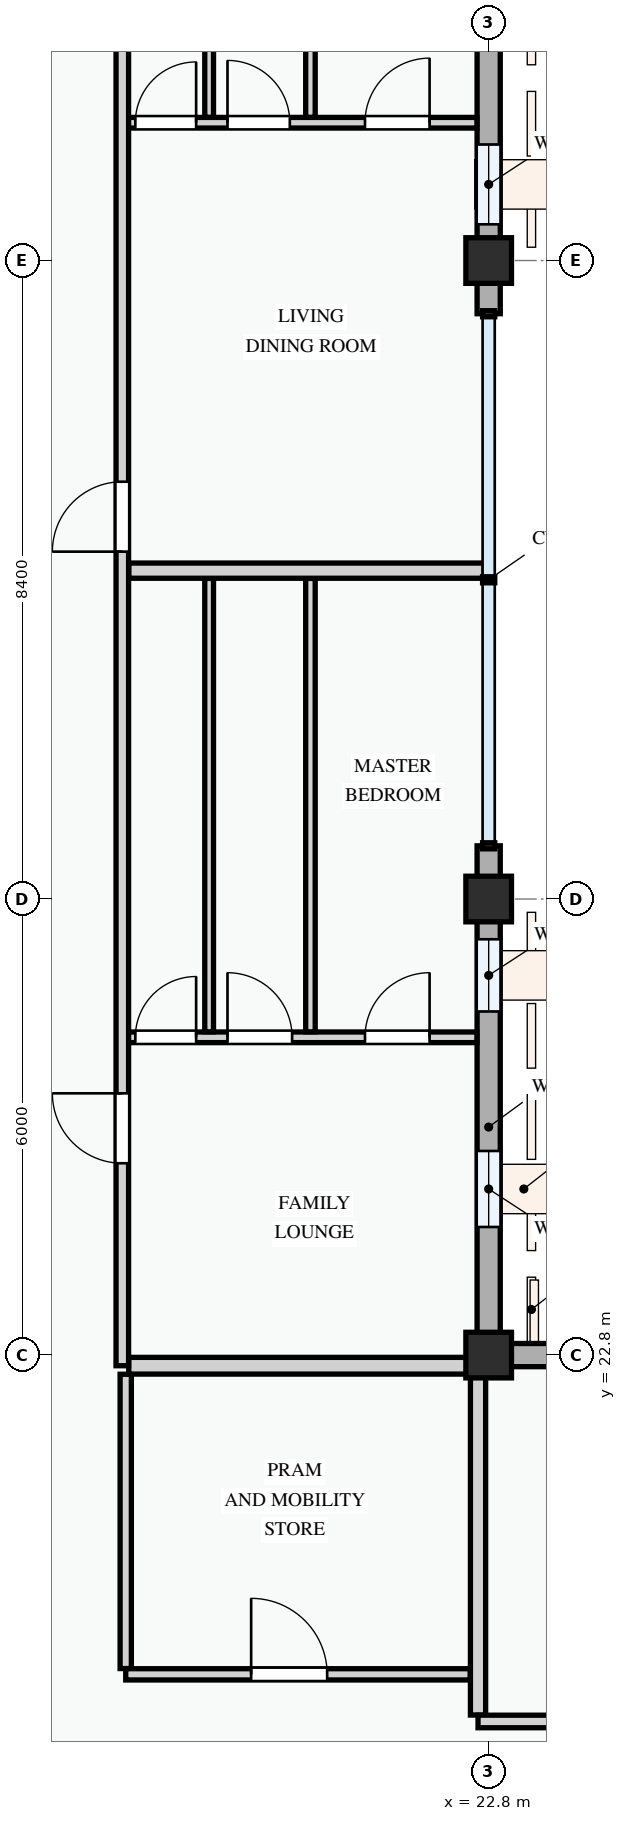
"""IFC4 building model, lengths in metres.
Left out: names, types, materials, properties, quantities, classifications, styles, units other than length and angle.
Written with IfcOpenShell. Run it as: python <this file> out.ifc"""

import sys

from ifc_helpers import new_model, si_unit, direction, frame, frame_2d, origin, origin_2d, place, context, subcontext, project, spatial, rectangle, extrude, element, fill, save


model = new_model("IFC4")
c1 = context("Model", 3, precision=1e-05, world=origin(), true_north=direction((0.0, 1.0)))
c2 = subcontext(c1, "Body", "Model", "MODEL_VIEW")
j1 = project(units=[si_unit("LENGTHUNIT", "METRE"), si_unit("PLANEANGLEUNIT", "RADIAN")], contexts=[c1])
p1 = place(None, origin())
s1 = spatial("IfcSite", under=j1, at=p1, CompositionType="ELEMENT")
p2 = place(p1, origin())
s2 = spatial("IfcBuilding", under=s1, at=p2, CompositionType="ELEMENT")
p3 = place(p2, frame((0.0, 0.0, 18.0)))
s3 = spatial("IfcBuildingStorey", under=s2, at=p3, CompositionType="ELEMENT", Elevation=18.0)
for number, where, z_axis, x_axis in (
    (1, (22.8, 22.8, 0.0), (0.0, 0.0, 1.0), (1.0, 0.0, 0.0)),
    (2, (22.8, 28.8, 0.0), (0.0, 0.0, 1.0), (1.0, 0.0, 0.0)),
    (3, (22.8, 37.2, 0.0), (0.0, 0.0, 1.0), (1.0, 0.0, 0.0)),
):
    element("IfcColumn", number, at=place(p3, frame(where, z_axis=z_axis, x_axis=x_axis)), inside=s3, PredefinedType="COLUMN", context=c2, shape_type="SweptSolid", body=[
        extrude(rectangle(XDim=0.6, YDim=0.6, at=origin_2d()), origin(), (0.0, 0.0, 1.0), 3.3),
    ])
p4 = place(p3, frame((22.8, 22.8, 0.0), z_axis=(0.0, 0.0, 1.0), x_axis=(0.0, 1.0, 0.0)))
e4 = element("IfcWall", 4, at=p4, inside=s3, PredefinedType="STANDARD", context=c2, shape_type="SweptSolid", body=[
    extrude(rectangle(XDim=6.0, YDim=0.305, at=frame_2d((3.0, 0.0))), origin(), (0.0, 0.0, 1.0), 2.575),
])
p5 = place(p4, frame((1.685, 0.0, 0.78)))
e5 = element("IfcOpeningElement", 5, at=p5, cuts=e4, PredefinedType="OPENING", context=c2, shape_type="SweptSolid", body=[
    extrude(rectangle(XDim=1.0, YDim=1.25, at=frame_2d((0.5, 0.625))), frame((0.0, 0.163, 0.0), z_axis=(0.0, -1.0, 0.0), x_axis=(1.0, 0.0, 0.0)), (0.0, 0.0, 1.0), 0.325),
])
p6 = place(p4, frame((4.521, 0.0, 0.78)))
e6 = element("IfcOpeningElement", 6, at=p6, cuts=e4, PredefinedType="OPENING", context=c2, shape_type="SweptSolid", body=[
    extrude(rectangle(XDim=0.95, YDim=1.15, at=frame_2d((0.475, 0.575))), frame((0.0, 0.163, 0.0), z_axis=(0.0, -1.0, 0.0), x_axis=(1.0, 0.0, 0.0)), (0.0, 0.0, 1.0), 0.325),
])
for number, where, z_axis, x_axis in (
    (7, (22.8, 28.8, 0.0), (0.0, 0.0, 1.0), (0.0, 1.0, 0.0)),
    (8, (22.8, 36.5, 0.0), (0.0, 0.0, 1.0), (0.0, 1.0, 0.0)),
):
    element("IfcWall", number, at=place(p3, frame(where, z_axis=z_axis, x_axis=x_axis)), inside=s3, PredefinedType="STANDARD", context=c2, shape_type="SweptSolid", body=[
        extrude(rectangle(XDim=0.7, YDim=0.305, at=frame_2d((0.35, 0.0))), origin(), (0.0, 0.0, 1.0), 2.425),
    ])
p7 = place(p3, frame((22.8, 37.2, 0.0), z_axis=(0.0, 0.0, 1.0), x_axis=(0.0, 1.0, 0.0)))
e9 = element("IfcWall", 9, at=p7, inside=s3, PredefinedType="STANDARD", context=c2, shape_type="SweptSolid", body=[
    extrude(rectangle(XDim=6.0, YDim=0.305, at=frame_2d((3.0, 0.0))), origin(), (0.0, 0.0, 1.0), 2.575),
])
p8 = place(p7, frame((0.476, 0.0, 0.78)))
e10 = element("IfcOpeningElement", 10, at=p8, cuts=e9, PredefinedType="OPENING", context=c2, shape_type="SweptSolid", body=[
    extrude(rectangle(XDim=1.05, YDim=1.2, at=frame_2d((0.525, 0.6))), frame((0.0, 0.163, 0.0), z_axis=(0.0, -1.0, 0.0), x_axis=(1.0, 0.0, 0.0)), (0.0, 0.0, 1.0), 0.325),
])
p9 = place(p7, frame((3.086, 0.0, 0.78)))
e11 = element("IfcOpeningElement", 11, at=p9, cuts=e9, PredefinedType="OPENING", context=c2, shape_type="SweptSolid", body=[
    extrude(rectangle(XDim=1.45, YDim=1.6, at=frame_2d((0.725, 0.8))), frame((0.0, 0.163, 0.0), z_axis=(0.0, -1.0, 0.0), x_axis=(1.0, 0.0, 0.0)), (0.0, 0.0, 1.0), 0.325),
])
p10 = place(p3, frame((28.8, 22.8, 0.0), z_axis=(0.0, 0.0, 1.0), x_axis=(-1.0, 0.0, 0.0)))
e12 = element("IfcWall", 12, at=p10, inside=s3, PredefinedType="STANDARD", context=c2, shape_type="SweptSolid", body=[
    extrude(rectangle(XDim=6.0, YDim=0.305, at=frame_2d((3.0, 0.0))), origin(), (0.0, 0.0, 1.0), 2.475),
])
p11 = place(p10, frame((0.555, 0.0, 0.78)))
e13 = element("IfcOpeningElement", 13, at=p11, cuts=e12, PredefinedType="OPENING", context=c2, shape_type="SweptSolid", body=[
    extrude(rectangle(XDim=0.9, YDim=1.2, at=frame_2d((0.45, 0.6))), frame((0.0, 0.163, 0.0), z_axis=(0.0, -1.0, 0.0), x_axis=(1.0, 0.0, 0.0)), (0.0, 0.0, 1.0), 0.325),
])
p12 = place(p10, frame((2.675, 0.0, 0.78)))
e14 = element("IfcOpeningElement", 14, at=p12, cuts=e12, PredefinedType="OPENING", context=c2, shape_type="SweptSolid", body=[
    extrude(rectangle(XDim=2.28, YDim=1.46, at=frame_2d((1.14, 0.73))), frame((0.0, 0.163, 0.0), z_axis=(0.0, -1.0, 0.0), x_axis=(1.0, 0.0, 0.0)), (0.0, 0.0, 1.0), 0.325),
])
p13 = place(p3, frame((18.025, 18.676, 0.0), z_axis=(0.0, 0.0, 1.0), x_axis=(0.0, 1.0, 0.0)))
e15 = element("IfcWall", 15, at=p13, inside=s3, PredefinedType="PARTITIONING", context=c2, shape_type="SweptSolid", body=[
    extrude(rectangle(XDim=3.872, YDim=0.148, at=frame_2d((1.936, 0.0))), origin(), (0.0, 0.0, 1.0), 3.0),
])
p14 = place(p3, frame((18.025, 18.6, 0.0), z_axis=(0.0, 0.0, 1.0), x_axis=(1.0, 0.0, 0.0)))
e16 = element("IfcWall", 16, at=p14, inside=s3, PredefinedType="PARTITIONING", context=c2, shape_type="SweptSolid", body=[
    extrude(rectangle(XDim=4.533, YDim=0.148, at=frame_2d((2.267, 0.0))), origin(), (0.0, 0.0, 1.0), 3.0),
])
p15 = place(p14, frame((1.65, 0.0, 0.0)))
e17 = element("IfcOpeningElement", 17, at=p15, cuts=e16, PredefinedType="OPENING", context=c2, shape_type="SweptSolid", body=[
    extrude(rectangle(XDim=1.0, YDim=2.15, at=frame_2d((0.5, 1.075))), frame((0.0, 0.084, 0.0), z_axis=(0.0, -1.0, 0.0), x_axis=(1.0, 0.0, 0.0)), (0.0, 0.0, 1.0), 0.168),
])
p16 = place(p3, frame((17.98, 26.981, 0.0), z_axis=(0.0, 0.0, 1.0), x_axis=(1.0, 0.0, 0.0)))
e18 = element("IfcWall", 18, at=p16, inside=s3, PredefinedType="PARTITIONING", context=c2, shape_type="SweptSolid", body=[
    extrude(rectangle(XDim=4.666, YDim=0.14, at=frame_2d((2.333, 0.0))), origin(), (0.0, 0.0, 1.0), 3.0),
])
p17 = place(p16, frame((0.171, 0.0, 0.0)))
e19 = element("IfcOpeningElement", 19, at=p17, cuts=e18, PredefinedType="OPENING", context=c2, shape_type="SweptSolid", body=[
    extrude(rectangle(XDim=0.8, YDim=2.1, at=frame_2d((0.4, 1.05))), frame((0.0, 0.08, 0.0), z_axis=(0.0, -1.0, 0.0), x_axis=(1.0, 0.0, 0.0)), (0.0, 0.0, 1.0), 0.16),
])
p18 = place(p16, frame((1.384, 0.0, 0.0)))
e20 = element("IfcOpeningElement", 20, at=p18, cuts=e18, PredefinedType="OPENING", context=c2, shape_type="SweptSolid", body=[
    extrude(rectangle(XDim=0.85, YDim=2.1, at=frame_2d((0.425, 1.05))), frame((0.0, 0.08, 0.0), z_axis=(0.0, -1.0, 0.0), x_axis=(1.0, 0.0, 0.0)), (0.0, 0.0, 1.0), 0.16),
])
p19 = place(p16, frame((3.193, 0.0, 0.0)))
e21 = element("IfcOpeningElement", 21, at=p19, cuts=e18, PredefinedType="OPENING", context=c2, shape_type="SweptSolid", body=[
    extrude(rectangle(XDim=0.85, YDim=2.1, at=frame_2d((0.425, 1.05))), frame((0.0, 0.08, 0.0), z_axis=(0.0, -1.0, 0.0), x_axis=(1.0, 0.0, 0.0)), (0.0, 0.0, 1.0), 0.16),
])
p20 = place(p3, frame((20.455, 27.053, 0.0), z_axis=(0.0, 0.0, 1.0), x_axis=(0.0, 1.0, 0.0)))
e22 = element("IfcWall", 22, at=p20, inside=s3, PredefinedType="PARTITIONING", context=c2, shape_type="SweptSolid", body=[
    extrude(rectangle(XDim=5.965, YDim=0.125, at=frame_2d((2.983, 0.0))), origin(), (0.0, 0.0, 1.0), 3.0),
])
p21 = place(p3, frame((19.122, 27.053, 0.0), z_axis=(0.0, 0.0, 1.0), x_axis=(0.0, 1.0, 0.0)))
e23 = element("IfcWall", 23, at=p21, inside=s3, PredefinedType="PARTITIONING", context=c2, shape_type="SweptSolid", body=[
    extrude(rectangle(XDim=5.965, YDim=0.115, at=frame_2d((2.983, 0.0))), origin(), (0.0, 0.0, 1.0), 3.0),
])
p22 = place(p3, frame((18.064, 22.66, 0.0), z_axis=(0.0, 0.0, 1.0), x_axis=(1.0, 0.0, 0.0)))
e24 = element("IfcWall", 24, at=p22, inside=s3, PredefinedType="PARTITIONING", context=c2, shape_type="SweptSolid", body=[
    extrude(rectangle(XDim=4.494, YDim=0.22, at=frame_2d((2.247, 0.0))), origin(), (0.0, 0.0, 1.0), 2.375),
])
p23 = place(p3, frame((17.98, 39.013, 0.0), z_axis=(0.0, 0.0, 1.0), x_axis=(1.0, 0.0, 0.0)))
e25 = element("IfcWall", 25, at=p23, inside=s3, PredefinedType="PARTITIONING", context=c2, shape_type="SweptSolid", body=[
    extrude(rectangle(XDim=4.666, YDim=0.14, at=frame_2d((2.333, 0.0))), origin(), (0.0, 0.0, 1.0), 3.0),
])
p24 = place(p23, frame((0.171, 0.0, 0.0)))
e26 = element("IfcOpeningElement", 26, at=p24, cuts=e25, PredefinedType="OPENING", context=c2, shape_type="SweptSolid", body=[
    extrude(rectangle(XDim=0.8, YDim=2.1, at=frame_2d((0.4, 1.05))), frame((0.0, 0.08, 0.0), z_axis=(0.0, -1.0, 0.0), x_axis=(1.0, 0.0, 0.0)), (0.0, 0.0, 1.0), 0.16),
])
p25 = place(p23, frame((1.384, 0.0, 0.0)))
e27 = element("IfcOpeningElement", 27, at=p25, cuts=e25, PredefinedType="OPENING", context=c2, shape_type="SweptSolid", body=[
    extrude(rectangle(XDim=0.82, YDim=2.08, at=frame_2d((0.41, 1.04))), frame((0.0, 0.08, 0.0), z_axis=(0.0, -1.0, 0.0), x_axis=(1.0, 0.0, 0.0)), (0.0, 0.0, 1.0), 0.16),
])
p26 = place(p23, frame((3.193, 0.0, 0.0)))
e28 = element("IfcOpeningElement", 28, at=p26, cuts=e25, PredefinedType="OPENING", context=c2, shape_type="SweptSolid", body=[
    extrude(rectangle(XDim=0.85, YDim=2.1, at=frame_2d((0.425, 1.05))), frame((0.0, 0.08, 0.0), z_axis=(0.0, -1.0, 0.0), x_axis=(1.0, 0.0, 0.0)), (0.0, 0.0, 1.0), 0.16),
])
p27 = place(p3, frame((20.455, 39.085, 0.0), z_axis=(0.0, 0.0, 1.0), x_axis=(0.0, 1.0, 0.0)))
e29 = element("IfcWall", 29, at=p27, inside=s3, PredefinedType="PARTITIONING", context=c2, shape_type="SweptSolid", body=[
    extrude(rectangle(XDim=5.801, YDim=0.125, at=frame_2d((2.9, 0.0))), origin(), (0.0, 0.0, 1.0), 3.0),
])
p28 = place(p3, frame((19.122, 39.085, 0.0), z_axis=(0.0, 0.0, 1.0), x_axis=(0.0, 1.0, 0.0)))
e30 = element("IfcWall", 30, at=p28, inside=s3, PredefinedType="PARTITIONING", context=c2, shape_type="SweptSolid", body=[
    extrude(rectangle(XDim=5.801, YDim=0.115, at=frame_2d((2.9, 0.0))), origin(), (0.0, 0.0, 1.0), 3.0),
])
p29 = place(p3, frame((18.064, 33.12, 0.0), z_axis=(0.0, 0.0, 1.0), x_axis=(1.0, 0.0, 0.0)))
e31 = element("IfcWall", 31, at=p29, inside=s3, PredefinedType="PARTITIONING", context=c2, shape_type="SweptSolid", body=[
    extrude(rectangle(XDim=4.676, YDim=0.2, at=frame_2d((2.338, 0.0))), origin(), (0.0, 0.0, 1.0), 3.0),
])
p30 = place(p3, frame((17.98, 22.66, 0.0), z_axis=(0.0, 0.0, 1.0), x_axis=(0.0, 1.0, 0.0)))
e32 = element("IfcWall", 32, at=p30, inside=s3, PredefinedType="PARTITIONING", context=c2, shape_type="SweptSolid", body=[
    extrude(rectangle(XDim=34.786, YDim=0.165, at=frame_2d((17.393, 0.0))), origin(), (0.0, 0.0, 1.0), 3.0),
])
p31 = place(p30, frame((2.664, 0.0, 0.0)))
e33 = element("IfcOpeningElement", 33, at=p31, cuts=e32, PredefinedType="OPENING", context=c2, shape_type="SweptSolid", body=[
    extrude(rectangle(XDim=0.92, YDim=2.1, at=frame_2d((0.46, 1.05))), frame((0.0, 0.093, 0.0), z_axis=(0.0, -1.0, 0.0), x_axis=(1.0, 0.0, 0.0)), (0.0, 0.0, 1.0), 0.185),
])
p32 = place(p30, frame((10.71, 0.0, 0.0)))
e34 = element("IfcOpeningElement", 34, at=p32, cuts=e32, PredefinedType="OPENING", context=c2, shape_type="SweptSolid", body=[
    extrude(rectangle(XDim=0.92, YDim=2.1, at=frame_2d((0.46, 1.05))), frame((0.0, 0.093, 0.0), z_axis=(0.0, -1.0, 0.0), x_axis=(1.0, 0.0, 0.0)), (0.0, 0.0, 1.0), 0.185),
])
p33 = place(p30, frame((24.254, 0.0, 0.0)))
e35 = element("IfcOpeningElement", 35, at=p33, cuts=e32, PredefinedType="OPENING", context=c2, shape_type="SweptSolid", body=[
    extrude(rectangle(XDim=0.92, YDim=2.1, at=frame_2d((0.46, 1.05))), frame((0.0, 0.093, 0.0), z_axis=(0.0, -1.0, 0.0), x_axis=(1.0, 0.0, 0.0)), (0.0, 0.0, 1.0), 0.185),
])
p34 = place(p3, frame((22.66, 18.064, 0.0), z_axis=(0.0, 0.0, 1.0), x_axis=(0.0, 1.0, 0.0)))
e36 = element("IfcWall", 36, at=p34, inside=s3, PredefinedType="PARTITIONING", context=c2, shape_type="SweptSolid", body=[
    extrude(rectangle(XDim=4.676, YDim=0.2, at=frame_2d((2.338, 0.0))), origin(), (0.0, 0.0, 1.0), 2.425),
])
p35 = place(p3, frame((22.66, 17.98, 0.0), z_axis=(0.0, 0.0, 1.0), x_axis=(1.0, 0.0, 0.0)))
e37 = element("IfcWall", 37, at=p35, inside=s3, PredefinedType="PARTITIONING", context=c2, shape_type="SweptSolid", body=[
    extrude(rectangle(XDim=34.88, YDim=0.165, at=frame_2d((17.44, 0.0))), origin(), (0.0, 0.0, 1.0), 3.0),
])
p36 = place(p35, frame((2.664, 0.0, 0.0)))
e38 = element("IfcOpeningElement", 38, at=p36, cuts=e37, PredefinedType="OPENING", context=c2, shape_type="SweptSolid", body=[
    extrude(rectangle(XDim=0.92, YDim=2.1, at=frame_2d((0.46, 1.05))), frame((0.0, 0.093, 0.0), z_axis=(0.0, -1.0, 0.0), x_axis=(1.0, 0.0, 0.0)), (0.0, 0.0, 1.0), 0.185),
])
p37 = place(p35, frame((10.71, 0.0, 0.0)))
e39 = element("IfcOpeningElement", 39, at=p37, cuts=e37, PredefinedType="OPENING", context=c2, shape_type="SweptSolid", body=[
    extrude(rectangle(XDim=0.92, YDim=2.1, at=frame_2d((0.46, 1.05))), frame((0.0, 0.093, 0.0), z_axis=(0.0, -1.0, 0.0), x_axis=(1.0, 0.0, 0.0)), (0.0, 0.0, 1.0), 0.185),
])
p38 = place(p35, frame((24.254, 0.0, 0.0)))
e40 = element("IfcOpeningElement", 40, at=p38, cuts=e37, PredefinedType="OPENING", context=c2, shape_type="SweptSolid", body=[
    extrude(rectangle(XDim=0.92, YDim=2.1, at=frame_2d((0.46, 1.05))), frame((0.0, 0.093, 0.0), z_axis=(0.0, -1.0, 0.0), x_axis=(1.0, 0.0, 0.0)), (0.0, 0.0, 1.0), 0.185),
])
p39 = place(p5, origin())
e41 = element("IfcWindow", 41, at=p39, inside=s3, PartitioningType="SINGLE_PANEL", PredefinedType="WINDOW", context=c2, shape_type="SweptSolid", body=[
    extrude(rectangle(XDim=1.0, YDim=1.25, at=frame_2d((0.5, 0.625))), frame((0.0, 0.03, 0.0), z_axis=(0.0, -1.0, 0.0), x_axis=(1.0, 0.0, 0.0)), (0.0, 0.0, 1.0), 0.06),
])
fill(e5, e41)
p40 = place(p6, origin())
e42 = element("IfcWindow", 42, at=p40, inside=s3, PartitioningType="SINGLE_PANEL", PredefinedType="WINDOW", context=c2, shape_type="SweptSolid", body=[
    extrude(rectangle(XDim=0.95, YDim=1.15, at=frame_2d((0.475, 0.575))), frame((0.0, 0.03, 0.0), z_axis=(0.0, -1.0, 0.0), x_axis=(1.0, 0.0, 0.0)), (0.0, 0.0, 1.0), 0.06),
])
fill(e6, e42)
p41 = place(p8, origin())
e43 = element("IfcWindow", 43, at=p41, inside=s3, PartitioningType="SINGLE_PANEL", PredefinedType="WINDOW", context=c2, shape_type="SweptSolid", body=[
    extrude(rectangle(XDim=1.05, YDim=1.2, at=frame_2d((0.525, 0.6))), frame((0.0, 0.03, 0.0), z_axis=(0.0, -1.0, 0.0), x_axis=(1.0, 0.0, 0.0)), (0.0, 0.0, 1.0), 0.06),
])
fill(e10, e43)
p42 = place(p15, origin())
e44 = element("IfcDoor", 44, at=p42, inside=s3, OperationType="SINGLE_SWING_LEFT", PredefinedType="DOOR", context=c2, shape_type="SweptSolid", body=[
    extrude(rectangle(XDim=1.0, YDim=2.15, at=frame_2d((0.5, 1.075))), frame((0.0, 0.025, 0.0), z_axis=(0.0, -1.0, 0.0), x_axis=(1.0, 0.0, 0.0)), (0.0, 0.0, 1.0), 0.05),
])
fill(e17, e44)
p43 = place(p17, origin())
e45 = element("IfcDoor", 45, at=p43, inside=s3, OperationType="SINGLE_SWING_RIGHT", PredefinedType="DOOR", context=c2, shape_type="SweptSolid", body=[
    extrude(rectangle(XDim=0.8, YDim=2.1, at=frame_2d((0.4, 1.05))), frame((0.0, 0.025, 0.0), z_axis=(0.0, -1.0, 0.0), x_axis=(1.0, 0.0, 0.0)), (0.0, 0.0, 1.0), 0.05),
])
fill(e19, e45)
p44 = place(p18, origin())
e46 = element("IfcDoor", 46, at=p44, inside=s3, OperationType="SINGLE_SWING_LEFT", PredefinedType="DOOR", context=c2, shape_type="SweptSolid", body=[
    extrude(rectangle(XDim=0.85, YDim=2.1, at=frame_2d((0.425, 1.05))), frame((0.0, 0.025, 0.0), z_axis=(0.0, -1.0, 0.0), x_axis=(1.0, 0.0, 0.0)), (0.0, 0.0, 1.0), 0.05),
])
fill(e20, e46)
p45 = place(p19, origin())
e47 = element("IfcDoor", 47, at=p45, inside=s3, OperationType="SINGLE_SWING_RIGHT", PredefinedType="DOOR", context=c2, shape_type="SweptSolid", body=[
    extrude(rectangle(XDim=0.85, YDim=2.1, at=frame_2d((0.425, 1.05))), frame((0.0, 0.025, 0.0), z_axis=(0.0, -1.0, 0.0), x_axis=(1.0, 0.0, 0.0)), (0.0, 0.0, 1.0), 0.05),
])
fill(e21, e47)
p46 = place(p24, origin())
e48 = element("IfcDoor", 48, at=p46, inside=s3, OperationType="SINGLE_SWING_RIGHT", PredefinedType="DOOR", context=c2, shape_type="SweptSolid", body=[
    extrude(rectangle(XDim=0.8, YDim=2.1, at=frame_2d((0.4, 1.05))), frame((0.0, 0.025, 0.0), z_axis=(0.0, -1.0, 0.0), x_axis=(1.0, 0.0, 0.0)), (0.0, 0.0, 1.0), 0.05),
])
fill(e26, e48)
p47 = place(p25, origin())
e49 = element("IfcDoor", 49, at=p47, inside=s3, OperationType="SINGLE_SWING_LEFT", PredefinedType="DOOR", context=c2, shape_type="SweptSolid", body=[
    extrude(rectangle(XDim=0.82, YDim=2.08, at=frame_2d((0.41, 1.04))), frame((0.0, 0.025, 0.0), z_axis=(0.0, -1.0, 0.0), x_axis=(1.0, 0.0, 0.0)), (0.0, 0.0, 1.0), 0.05),
])
fill(e27, e49)
p48 = place(p26, origin())
e50 = element("IfcDoor", 50, at=p48, inside=s3, OperationType="SINGLE_SWING_RIGHT", PredefinedType="DOOR", context=c2, shape_type="SweptSolid", body=[
    extrude(rectangle(XDim=0.85, YDim=2.1, at=frame_2d((0.425, 1.05))), frame((0.0, 0.025, 0.0), z_axis=(0.0, -1.0, 0.0), x_axis=(1.0, 0.0, 0.0)), (0.0, 0.0, 1.0), 0.05),
])
fill(e28, e50)
p49 = place(p31, origin())
e51 = element("IfcDoor", 51, at=p49, inside=s3, OperationType="SINGLE_SWING_RIGHT", PredefinedType="DOOR", context=c2, shape_type="SweptSolid", body=[
    extrude(rectangle(XDim=0.92, YDim=2.1, at=frame_2d((0.46, 1.05))), frame((0.0, 0.025, 0.0), z_axis=(0.0, -1.0, 0.0), x_axis=(1.0, 0.0, 0.0)), (0.0, 0.0, 1.0), 0.05),
])
fill(e33, e51)
p50 = place(p32, origin())
e52 = element("IfcDoor", 52, at=p50, inside=s3, OperationType="SINGLE_SWING_LEFT", PredefinedType="DOOR", context=c2, shape_type="SweptSolid", body=[
    extrude(rectangle(XDim=0.92, YDim=2.1, at=frame_2d((0.46, 1.05))), frame((0.0, 0.025, 0.0), z_axis=(0.0, -1.0, 0.0), x_axis=(1.0, 0.0, 0.0)), (0.0, 0.0, 1.0), 0.05),
])
fill(e34, e52)
save(model, sys.argv[1])
